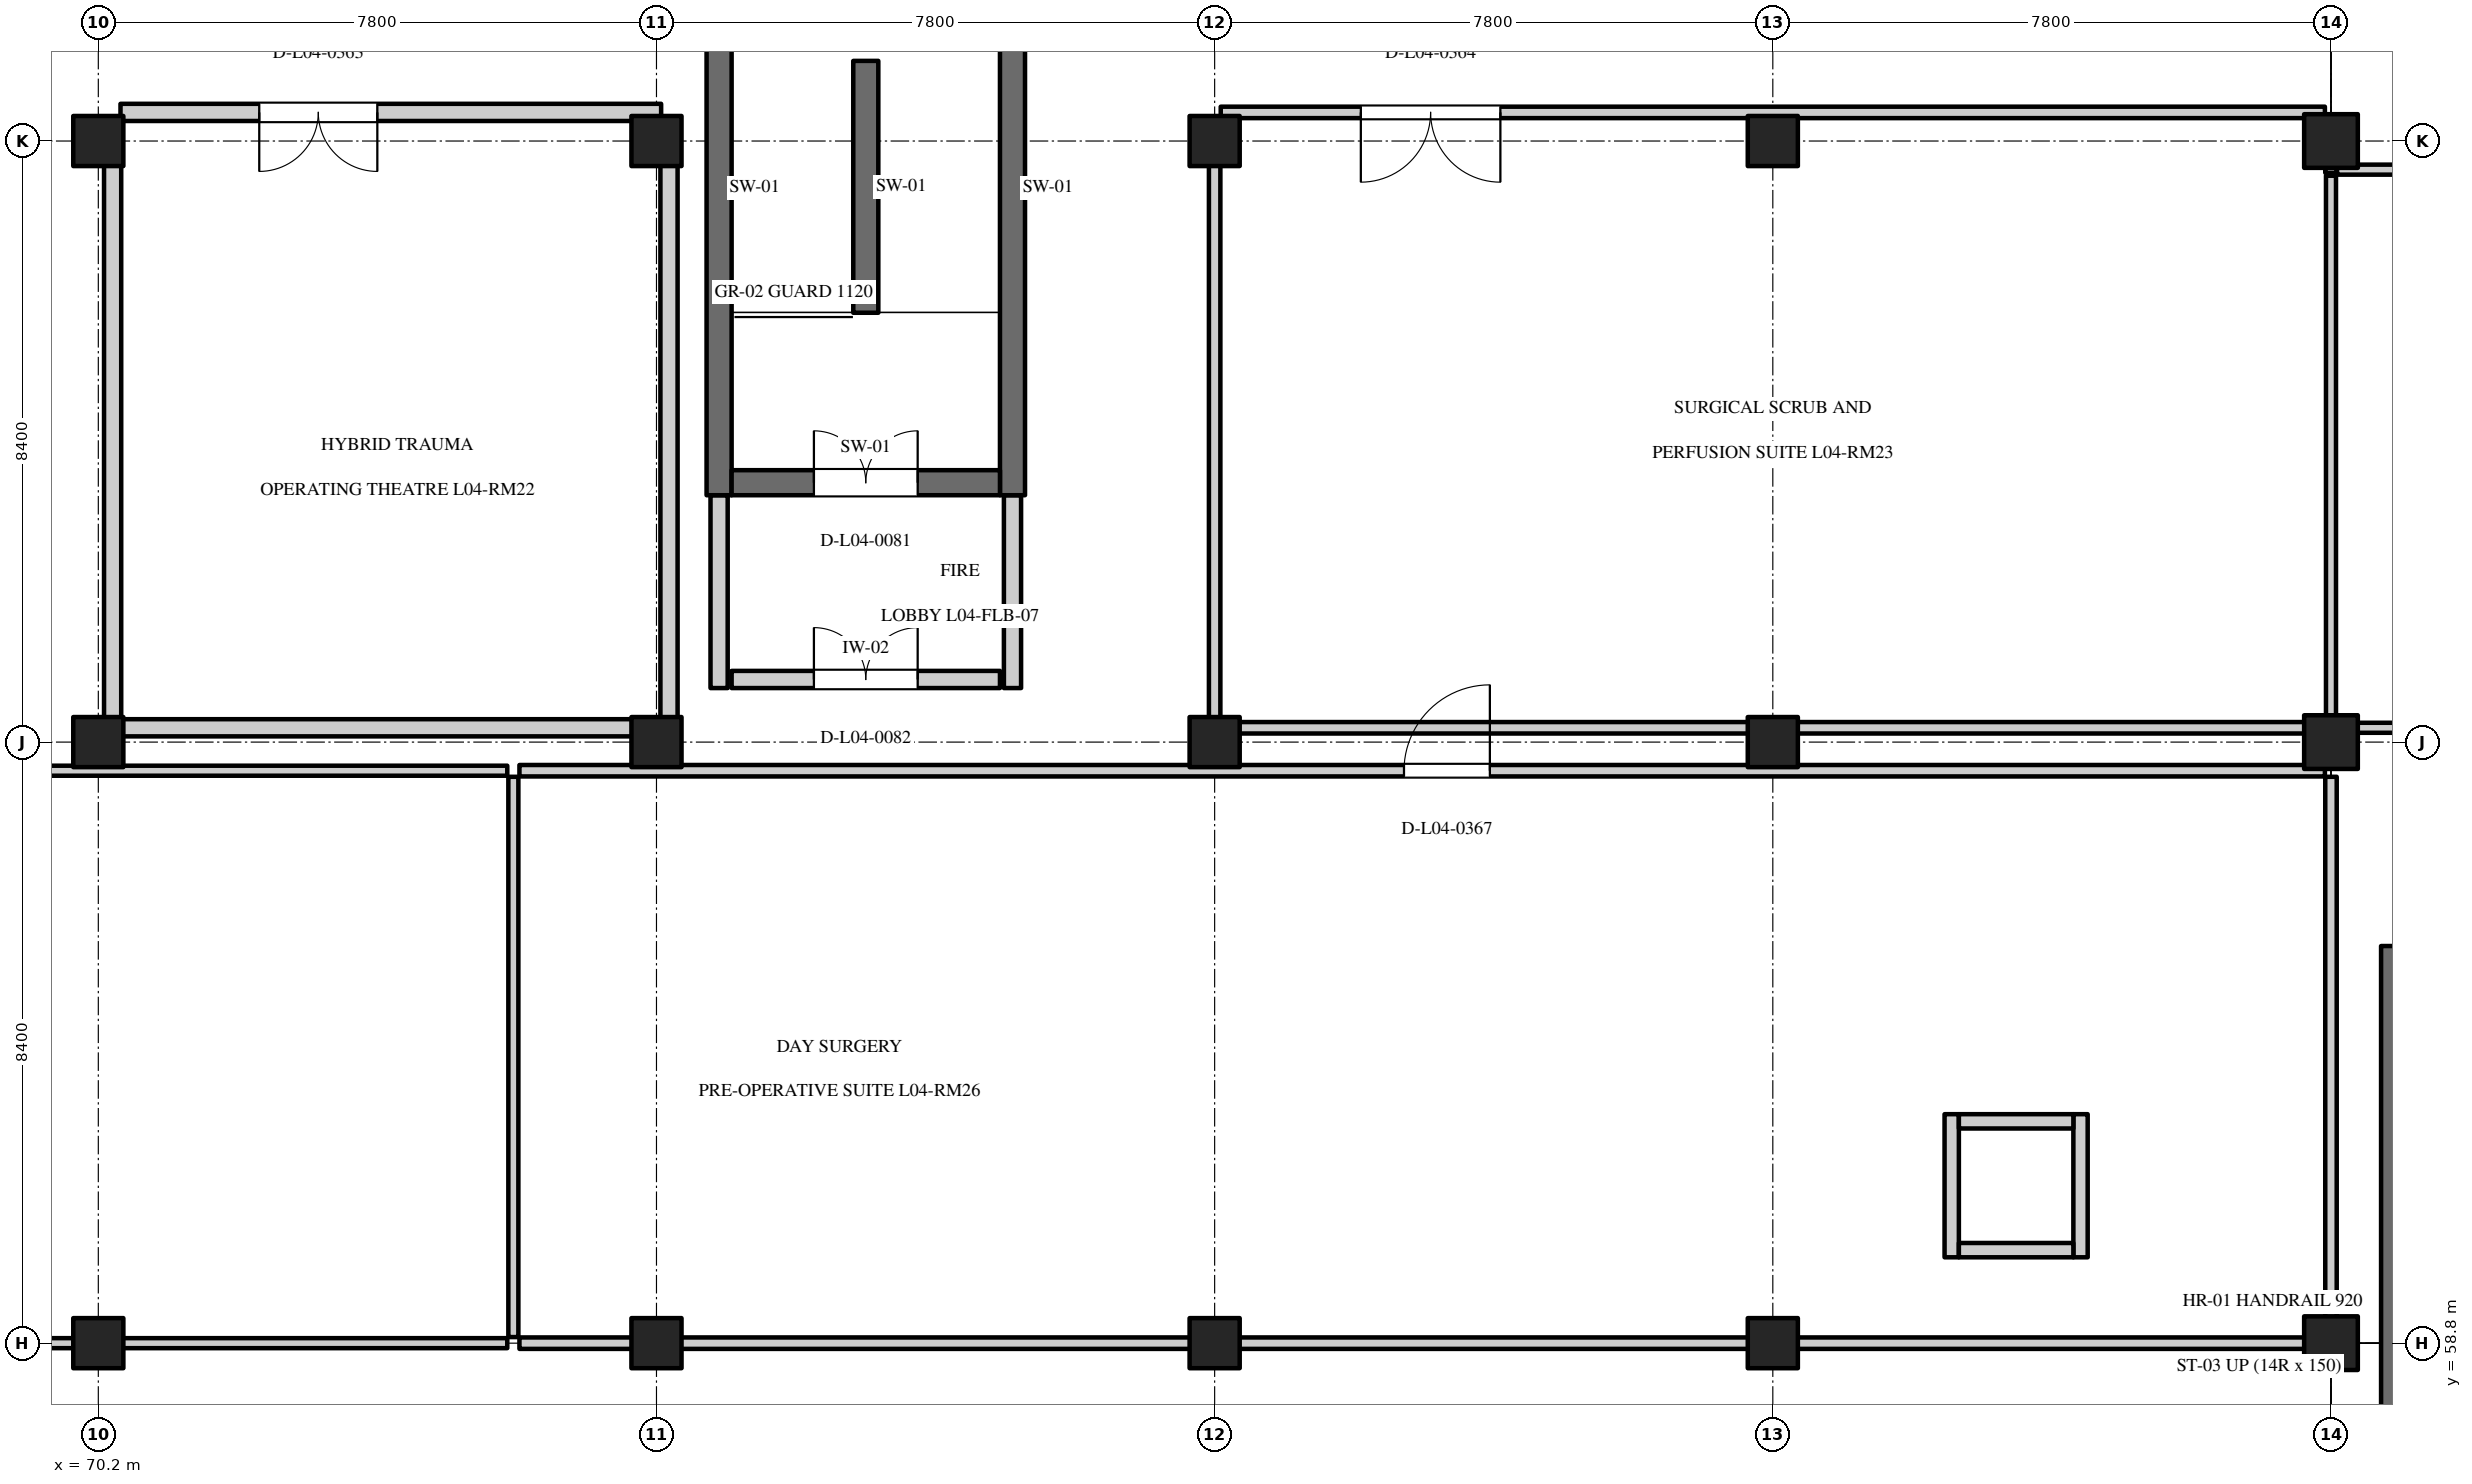
"""IFC4 building model, lengths in metres.
Left out: names, types, materials, properties, quantities, classifications, styles, units other than length and angle.
Written with IfcOpenShell. Run it as: python <this file> out.ifc"""

import sys

from ifc_helpers import new_model, si_unit, direction, frame, frame_2d, origin, origin_2d, place, context, subcontext, project, spatial, rectangle, extrude, element, fill, save


model = new_model("IFC4")
c1 = context("Model", 3, precision=1e-05, world=origin(), true_north=direction((0.0, 1.0)))
c2 = subcontext(c1, "Body", "Model", "MODEL_VIEW")
j1 = project(units=[si_unit("LENGTHUNIT", "METRE"), si_unit("PLANEANGLEUNIT", "RADIAN")], contexts=[c1])
p1 = place(None, origin())
s1 = spatial("IfcSite", under=j1, at=p1, CompositionType="ELEMENT")
p2 = place(p1, origin())
s2 = spatial("IfcBuilding", under=s1, at=p2, CompositionType="ELEMENT")
p3 = place(p2, frame((0.0, 0.0, 18.0)))
s3 = spatial("IfcBuildingStorey", under=s2, at=p3, CompositionType="ELEMENT", Elevation=18.0)
for number, where, z_axis, x_axis in (
    (1, (70.2, 58.8, 0.0), (0.0, 0.0, 1.0), (1.0, 0.0, 0.0)),
    (2, (70.2, 67.2, 0.0), (0.0, 0.0, 1.0), (1.0, 0.0, 0.0)),
    (3, (70.2, 75.6, 0.0), (0.0, 0.0, 1.0), (1.0, 0.0, 0.0)),
    (4, (78.0, 58.8, 0.0), (0.0, 0.0, 1.0), (1.0, 0.0, 0.0)),
    (5, (78.0, 67.2, 0.0), (0.0, 0.0, 1.0), (1.0, 0.0, 0.0)),
    (6, (78.0, 75.6, 0.0), (0.0, 0.0, 1.0), (1.0, 0.0, 0.0)),
    (7, (85.8, 58.8, 0.0), (0.0, 0.0, 1.0), (1.0, 0.0, 0.0)),
    (8, (85.8, 67.2, 0.0), (0.0, 0.0, 1.0), (1.0, 0.0, 0.0)),
    (9, (85.8, 75.6, 0.0), (0.0, 0.0, 1.0), (1.0, 0.0, 0.0)),
    (10, (93.6, 58.8, 0.0), (0.0, 0.0, 1.0), (1.0, 0.0, 0.0)),
    (11, (93.6, 67.2, 0.0), (0.0, 0.0, 1.0), (1.0, 0.0, 0.0)),
    (12, (93.6, 75.6, 0.0), (0.0, 0.0, 1.0), (1.0, 0.0, 0.0)),
):
    element("IfcColumn", number, at=place(p3, frame(where, z_axis=z_axis, x_axis=x_axis)), inside=s3, PredefinedType="COLUMN", context=c2, shape_type="SweptSolid", body=[
        extrude(rectangle(XDim=0.7, YDim=0.7, at=origin_2d()), origin(), (0.0, 0.0, 1.0), 4.2),
    ])
for number, where, z_axis, x_axis in (
    (13, (101.4, 58.8, 0.0), (0.0, 0.0, 1.0), (1.0, 0.0, 0.0)),
    (14, (101.4, 67.2, 0.0), (0.0, 0.0, 1.0), (1.0, 0.0, 0.0)),
    (15, (101.4, 75.6, 0.0), (0.0, 0.0, 1.0), (1.0, 0.0, 0.0)),
):
    element("IfcColumn", number, at=place(p3, frame(where, z_axis=z_axis, x_axis=x_axis)), inside=s3, PredefinedType="COLUMN", context=c2, shape_type="SweptSolid", body=[
        extrude(rectangle(XDim=0.75, YDim=0.75, at=origin_2d()), origin(), (0.0, 0.0, 1.0), 4.2),
    ])
p4 = place(p3, frame((102.275, 53.85, 0.0), z_axis=(0.0, 0.0, 1.0), x_axis=(0.0, 1.0, 0.0)))
e16 = element("IfcWall", 16, at=p4, inside=s3, PredefinedType="SHEAR", context=c2, shape_type="SweptSolid", body=[
    extrude(rectangle(XDim=10.5, YDim=0.35, at=frame_2d((5.25, 0.0))), origin(), (0.0, 0.0, 1.0), 4.2),
])
for number, where, z_axis, x_axis in (
    (17, (78.875, 70.65, 0.0), (0.0, 0.0, 1.0), (0.0, 1.0, 0.0)),
    (18, (82.975, 70.65, 0.0), (0.0, 0.0, 1.0), (0.0, 1.0, 0.0)),
):
    element("IfcWall", number, at=place(p3, frame(where, z_axis=z_axis, x_axis=x_axis)), inside=s3, PredefinedType="SHEAR", context=c2, shape_type="SweptSolid", body=[
        extrude(rectangle(XDim=10.5, YDim=0.35, at=frame_2d((5.25, 0.0))), origin(), (0.0, 0.0, 1.0), 3.885),
    ])
p5 = place(p3, frame((79.05, 70.825, 0.0), z_axis=(0.0, 0.0, 1.0), x_axis=(1.0, 0.0, 0.0)))
e19 = element("IfcWall", 19, at=p5, inside=s3, PredefinedType="SHEAR", context=c2, shape_type="SweptSolid", body=[
    extrude(rectangle(XDim=3.75, YDim=0.35, at=frame_2d((1.875, 0.0))), origin(), (0.0, 0.0, 1.0), 3.885),
])
p6 = place(p5, frame((1.15, 0.0, 0.0)))
e20 = element("IfcOpeningElement", 20, at=p6, cuts=e19, PredefinedType="OPENING", context=c2, shape_type="SweptSolid", body=[
    extrude(rectangle(XDim=1.45, YDim=2.2, at=frame_2d((0.725, 1.1))), frame((0.0, 0.187, 0.0), z_axis=(0.0, -1.0, 0.0), x_axis=(1.0, 0.0, 0.0)), (0.0, 0.0, 1.0), 0.374),
])
for number, where, z_axis, x_axis in (
    (21, (78.875, 67.955, 0.0), (0.0, 0.0, 1.0), (0.0, 1.0, 0.0)),
    (22, (82.975, 67.955, 0.0), (0.0, 0.0, 1.0), (0.0, 1.0, 0.0)),
):
    element("IfcWall", number, at=place(p3, frame(where, z_axis=z_axis, x_axis=x_axis)), inside=s3, PredefinedType="STANDARD", context=c2, shape_type="SweptSolid", body=[
        extrude(rectangle(XDim=2.695, YDim=0.24, at=frame_2d((1.347, 0.0))), origin(), (0.0, 0.0, 1.0), 3.885),
    ])
p7 = place(p3, frame((79.05, 68.075, 0.0), z_axis=(0.0, 0.0, 1.0), x_axis=(1.0, 0.0, 0.0)))
e23 = element("IfcWall", 23, at=p7, inside=s3, PredefinedType="STANDARD", context=c2, shape_type="SweptSolid", body=[
    extrude(rectangle(XDim=3.75, YDim=0.24, at=frame_2d((1.875, 0.0))), origin(), (0.0, 0.0, 1.0), 3.885),
])
p8 = place(p7, frame((1.15, 0.0, 0.0)))
e24 = element("IfcOpeningElement", 24, at=p8, cuts=e23, PredefinedType="OPENING", context=c2, shape_type="SweptSolid", body=[
    extrude(rectangle(XDim=1.45, YDim=2.2, at=frame_2d((0.725, 1.1))), frame((0.0, 0.132, 0.0), z_axis=(0.0, -1.0, 0.0), x_axis=(1.0, 0.0, 0.0)), (0.0, 0.0, 1.0), 0.264),
])
p9 = place(p3, frame((80.925, 73.2, 0.0), z_axis=(0.0, 0.0, 1.0), x_axis=(0.0, 1.0, 0.0)))
e25 = element("IfcWall", 25, at=p9, inside=s3, PredefinedType="SHEAR", context=c2, shape_type="SweptSolid", body=[
    extrude(rectangle(XDim=3.52, YDim=0.35, at=frame_2d((1.76, 0.0))), origin(), (0.0, 0.0, 1.0), 3.885),
])
for number, where, z_axis, x_axis in (
    (26, (96.1, 60.0, 0.0), (0.0, 0.0, 1.0), (0.0, 1.0, 0.0)),
    (27, (97.9, 60.0, 0.0), (0.0, 0.0, 1.0), (0.0, 1.0, 0.0)),
):
    element("IfcWall", number, at=place(p3, frame(where, z_axis=z_axis, x_axis=x_axis)), inside=s3, PredefinedType="STANDARD", context=c2, shape_type="SweptSolid", body=[
        extrude(rectangle(XDim=2.0, YDim=0.2, at=frame_2d((1.0, 0.0))), origin(), (0.0, 0.0, 1.0), 3.885),
    ])
for number, where, z_axis, x_axis in (
    (28, (96.2, 60.1, 0.0), (0.0, 0.0, 1.0), (1.0, 0.0, 0.0)),
    (29, (96.2, 61.9, 0.0), (0.0, 0.0, 1.0), (1.0, 0.0, 0.0)),
):
    element("IfcWall", number, at=place(p3, frame(where, z_axis=z_axis, x_axis=x_axis)), inside=s3, PredefinedType="STANDARD", context=c2, shape_type="SweptSolid", body=[
        extrude(rectangle(XDim=1.6, YDim=0.2, at=frame_2d((0.8, 0.0))), origin(), (0.0, 0.0, 1.0), 3.885),
    ])
p10 = place(p3, frame((101.485, 67.4, 0.0), z_axis=(0.0, 0.0, 1.0), x_axis=(1.0, 0.0, 0.0)))
e30 = element("IfcWall", 30, at=p10, inside=s3, PredefinedType="PARTITIONING", context=c2, shape_type="SweptSolid", body=[
    extrude(rectangle(XDim=7.43, YDim=0.14, at=frame_2d((3.715, 0.0))), origin(), (0.0, 0.0, 1.0), 3.865),
])
p11 = place(p3, frame((101.485, 75.2, 0.0), z_axis=(0.0, 0.0, 1.0), x_axis=(1.0, 0.0, 0.0)))
e31 = element("IfcWall", 31, at=p11, inside=s3, PredefinedType="PARTITIONING", context=c2, shape_type="SweptSolid", body=[
    extrude(rectangle(XDim=7.43, YDim=0.14, at=frame_2d((3.715, 0.0))), origin(), (0.0, 0.0, 1.0), 3.385),
])
p12 = place(p3, frame((101.4, 67.485, 0.0), z_axis=(0.0, 0.0, 1.0), x_axis=(0.0, 1.0, 0.0)))
e32 = element("IfcWall", 32, at=p12, inside=s3, PredefinedType="PARTITIONING", context=c2, shape_type="SweptSolid", body=[
    extrude(rectangle(XDim=7.63, YDim=0.14, at=frame_2d((3.815, 0.0))), origin(), (0.0, 0.0, 1.0), 3.235),
])
p13 = place(p3, frame((70.51, 76.0, 0.0), z_axis=(0.0, 0.0, 1.0), x_axis=(1.0, 0.0, 0.0)))
e33 = element("IfcWall", 33, at=p13, inside=s3, PredefinedType="STANDARD", context=c2, shape_type="SweptSolid", body=[
    extrude(rectangle(XDim=7.555, YDim=0.24, at=frame_2d((3.777, 0.0))), origin(), (0.0, 0.0, 1.0), 3.385),
])
p14 = place(p13, frame((1.939, 0.0, 0.0)))
e34 = element("IfcOpeningElement", 34, at=p14, cuts=e33, PredefinedType="OPENING", context=c2, shape_type="SweptSolid", body=[
    extrude(rectangle(XDim=1.65, YDim=2.25, at=frame_2d((0.825, 1.125))), frame((0.0, 0.132, 0.0), z_axis=(0.0, -1.0, 0.0), x_axis=(1.0, 0.0, 0.0)), (0.0, 0.0, 1.0), 0.264),
])
p15 = place(p3, frame((70.51, 67.4, 0.0), z_axis=(0.0, 0.0, 1.0), x_axis=(1.0, 0.0, 0.0)))
e35 = element("IfcWall", 35, at=p15, inside=s3, PredefinedType="STANDARD", context=c2, shape_type="SweptSolid", body=[
    extrude(rectangle(XDim=7.555, YDim=0.24, at=frame_2d((3.777, 0.0))), origin(), (0.0, 0.0, 1.0), 3.865),
])
for number, where, z_axis, x_axis in (
    (36, (70.4, 67.51, 0.0), (0.0, 0.0, 1.0), (0.0, 1.0, 0.0)),
    (37, (78.175, 67.51, 0.0), (0.0, 0.0, 1.0), (0.0, 1.0, 0.0)),
):
    element("IfcWall", number, at=place(p3, frame(where, z_axis=z_axis, x_axis=x_axis)), inside=s3, PredefinedType="STANDARD", context=c2, shape_type="SweptSolid", body=[
        extrude(rectangle(XDim=8.38, YDim=0.24, at=frame_2d((4.19, 0.0))), origin(), (0.0, 0.0, 1.0), 3.235),
    ])
p16 = place(p3, frame((85.885, 76.0, 0.0), z_axis=(0.0, 0.0, 1.0), x_axis=(1.0, 0.0, 0.0)))
e38 = element("IfcWall", 38, at=p16, inside=s3, PredefinedType="PARTITIONING", context=c2, shape_type="SweptSolid", body=[
    extrude(rectangle(XDim=15.43, YDim=0.16, at=frame_2d((7.715, 0.0))), origin(), (0.0, 0.0, 1.0), 3.385),
])
p17 = place(p16, frame((1.958, 0.0, 0.0)))
e39 = element("IfcOpeningElement", 39, at=p17, cuts=e38, PredefinedType="OPENING", context=c2, shape_type="SweptSolid", body=[
    extrude(rectangle(XDim=1.95, YDim=2.35, at=frame_2d((0.975, 1.175))), frame((0.0, 0.092, 0.0), z_axis=(0.0, -1.0, 0.0), x_axis=(1.0, 0.0, 0.0)), (0.0, 0.0, 1.0), 0.184),
])
p18 = place(p3, frame((85.885, 67.4, 0.0), z_axis=(0.0, 0.0, 1.0), x_axis=(1.0, 0.0, 0.0)))
e40 = element("IfcWall", 40, at=p18, inside=s3, PredefinedType="PARTITIONING", context=c2, shape_type="SweptSolid", body=[
    extrude(rectangle(XDim=15.43, YDim=0.16, at=frame_2d((7.715, 0.0))), origin(), (0.0, 0.0, 1.0), 3.865),
])
p19 = place(p3, frame((85.8, 67.485, 0.0), z_axis=(0.0, 0.0, 1.0), x_axis=(0.0, 1.0, 0.0)))
e41 = element("IfcWall", 41, at=p19, inside=s3, PredefinedType="PARTITIONING", context=c2, shape_type="SweptSolid", body=[
    extrude(rectangle(XDim=8.43, YDim=0.16, at=frame_2d((4.215, 0.0))), origin(), (0.0, 0.0, 1.0), 3.865),
])
p20 = place(p3, frame((101.4, 75.155, 0.0), z_axis=(0.0, 0.0, 1.0), x_axis=(0.0, 1.0, 0.0)))
e42 = element("IfcWall", 42, at=p20, inside=s3, PredefinedType="PARTITIONING", context=c2, shape_type="SweptSolid", body=[
    extrude(rectangle(XDim=0.76, YDim=0.16, at=frame_2d((0.38, 0.0))), origin(), (0.0, 0.0, 1.0), 3.235),
])
p21 = place(p3, frame((54.685, 66.8, 0.0), z_axis=(0.0, 0.0, 1.0), x_axis=(1.0, 0.0, 0.0)))
e43 = element("IfcWall", 43, at=p21, inside=s3, PredefinedType="PARTITIONING", context=c2, shape_type="SweptSolid", body=[
    extrude(rectangle(XDim=21.23, YDim=0.14, at=frame_2d((10.615, 0.0))), origin(), (0.0, 0.0, 1.0), 3.865),
])
p22 = place(p21, frame((2.661, 0.0, 0.0)))
e44 = element("IfcOpeningElement", 44, at=p22, cuts=e43, PredefinedType="OPENING", context=c2, shape_type="SweptSolid", body=[
    extrude(rectangle(XDim=1.15, YDim=2.15, at=frame_2d((0.575, 1.075))), frame((0.0, 0.082, 0.0), z_axis=(0.0, -1.0, 0.0), x_axis=(1.0, 0.0, 0.0)), (0.0, 0.0, 1.0), 0.164),
])
p23 = place(p3, frame((54.685, 58.8, 0.0), z_axis=(0.0, 0.0, 1.0), x_axis=(1.0, 0.0, 0.0)))
e45 = element("IfcWall", 45, at=p23, inside=s3, PredefinedType="PARTITIONING", context=c2, shape_type="SweptSolid", body=[
    extrude(rectangle(XDim=21.23, YDim=0.14, at=frame_2d((10.615, 0.0))), origin(), (0.0, 0.0, 1.0), 3.235),
])
p24 = place(p3, frame((76.0, 58.885, 0.0), z_axis=(0.0, 0.0, 1.0), x_axis=(0.0, 1.0, 0.0)))
e46 = element("IfcWall", 46, at=p24, inside=s3, PredefinedType="PARTITIONING", context=c2, shape_type="SweptSolid", body=[
    extrude(rectangle(XDim=7.83, YDim=0.14, at=frame_2d((3.915, 0.0))), origin(), (0.0, 0.0, 1.0), 3.865),
])
p25 = place(p3, frame((76.085, 66.8, 0.0), z_axis=(0.0, 0.0, 1.0), x_axis=(1.0, 0.0, 0.0)))
e47 = element("IfcWall", 47, at=p25, inside=s3, PredefinedType="PARTITIONING", context=c2, shape_type="SweptSolid", body=[
    extrude(rectangle(XDim=25.23, YDim=0.16, at=frame_2d((12.615, 0.0))), origin(), (0.0, 0.0, 1.0), 3.865),
])
p26 = place(p25, frame((12.361, 0.0, 0.0)))
e48 = element("IfcOpeningElement", 48, at=p26, cuts=e47, PredefinedType="OPENING", context=c2, shape_type="SweptSolid", body=[
    extrude(rectangle(XDim=1.2, YDim=2.15, at=frame_2d((0.6, 1.075))), frame((0.0, 0.092, 0.0), z_axis=(0.0, -1.0, 0.0), x_axis=(1.0, 0.0, 0.0)), (0.0, 0.0, 1.0), 0.184),
])
p27 = place(p3, frame((76.085, 58.8, 0.0), z_axis=(0.0, 0.0, 1.0), x_axis=(1.0, 0.0, 0.0)))
e49 = element("IfcWall", 49, at=p27, inside=s3, PredefinedType="PARTITIONING", context=c2, shape_type="SweptSolid", body=[
    extrude(rectangle(XDim=25.23, YDim=0.16, at=frame_2d((12.615, 0.0))), origin(), (0.0, 0.0, 1.0), 3.235),
])
p28 = place(p3, frame((101.4, 58.885, 0.0), z_axis=(0.0, 0.0, 1.0), x_axis=(0.0, 1.0, 0.0)))
e50 = element("IfcWall", 50, at=p28, inside=s3, PredefinedType="PARTITIONING", context=c2, shape_type="SweptSolid", body=[
    extrude(rectangle(XDim=7.83, YDim=0.16, at=frame_2d((3.915, 0.0))), origin(), (0.0, 0.0, 1.0), 3.235),
])
p29 = place(p6, origin())
e51 = element("IfcDoor", 51, at=p29, inside=s3, OperationType="DOUBLE_DOOR_SINGLE_SWING", PredefinedType="DOOR", context=c2, shape_type="SweptSolid", body=[
    extrude(rectangle(XDim=1.45, YDim=2.2, at=frame_2d((0.725, 1.1))), frame((0.0, 0.025, 0.0), z_axis=(0.0, -1.0, 0.0), x_axis=(1.0, 0.0, 0.0)), (0.0, 0.0, 1.0), 0.05),
])
fill(e20, e51)
p30 = place(p8, origin())
e52 = element("IfcDoor", 52, at=p30, inside=s3, OperationType="DOUBLE_DOOR_SINGLE_SWING", PredefinedType="DOOR", context=c2, shape_type="SweptSolid", body=[
    extrude(rectangle(XDim=1.45, YDim=2.2, at=frame_2d((0.725, 1.1))), frame((0.0, 0.025, 0.0), z_axis=(0.0, -1.0, 0.0), x_axis=(1.0, 0.0, 0.0)), (0.0, 0.0, 1.0), 0.05),
])
fill(e24, e52)
p31 = place(p14, frame((1.65, 0.0, 0.0), z_axis=(0.0, 0.0, 1.0), x_axis=(-1.0, 0.0, 0.0)))
e53 = element("IfcDoor", 53, at=p31, inside=s3, OperationType="DOUBLE_DOOR_SINGLE_SWING", PredefinedType="DOOR", context=c2, shape_type="SweptSolid", body=[
    extrude(rectangle(XDim=1.65, YDim=2.25, at=frame_2d((0.825, 1.125))), frame((0.0, 0.025, 0.0), z_axis=(0.0, -1.0, 0.0), x_axis=(1.0, 0.0, 0.0)), (0.0, 0.0, 1.0), 0.05),
])
fill(e34, e53)
p32 = place(p17, frame((1.95, 0.0, 0.0), z_axis=(0.0, 0.0, 1.0), x_axis=(-1.0, 0.0, 0.0)))
e54 = element("IfcDoor", 54, at=p32, inside=s3, OperationType="DOUBLE_DOOR_SINGLE_SWING", PredefinedType="DOOR", context=c2, shape_type="SweptSolid", body=[
    extrude(rectangle(XDim=1.95, YDim=2.35, at=frame_2d((0.975, 1.175))), frame((0.0, 0.025, 0.0), z_axis=(0.0, -1.0, 0.0), x_axis=(1.0, 0.0, 0.0)), (0.0, 0.0, 1.0), 0.05),
])
fill(e39, e54)
p33 = place(p26, frame((1.2, 0.0, 0.0), z_axis=(0.0, 0.0, 1.0), x_axis=(-1.0, 0.0, 0.0)))
e55 = element("IfcDoor", 55, at=p33, inside=s3, OperationType="SINGLE_SWING_LEFT", PredefinedType="DOOR", context=c2, shape_type="SweptSolid", body=[
    extrude(rectangle(XDim=1.2, YDim=2.15, at=frame_2d((0.6, 1.075))), frame((0.0, 0.025, 0.0), z_axis=(0.0, -1.0, 0.0), x_axis=(1.0, 0.0, 0.0)), (0.0, 0.0, 1.0), 0.05),
])
fill(e48, e55)
save(model, sys.argv[1])
